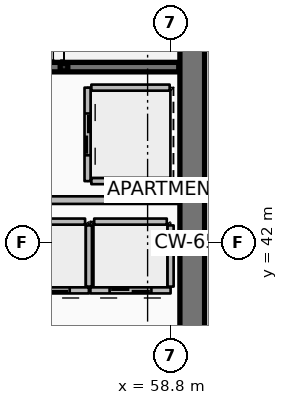
"""IFC4 building model, lengths in metres.
Left out: names, types, materials, properties, quantities, classifications, styles, units other than length and angle.
Written with IfcOpenShell. Run it as: python <this file> out.ifc"""

import sys

from ifc_helpers import new_model, si_unit, direction, frame, frame_2d, origin, origin_2d, place, context, subcontext, project, spatial, rectangle, hollow_rectangle, extrude, element, fill, save


model = new_model("IFC4")
c1 = context("Model", 3, precision=1e-05, world=origin(), true_north=direction((0.0, 1.0)))
c2 = subcontext(c1, "Body", "Model", "MODEL_VIEW")
j1 = project(units=[si_unit("LENGTHUNIT", "METRE"), si_unit("PLANEANGLEUNIT", "RADIAN")], contexts=[c1])
p1 = place(None, origin())
s1 = spatial("IfcSite", under=j1, at=p1, CompositionType="ELEMENT")
p2 = place(p1, origin())
s2 = spatial("IfcBuilding", under=s1, at=p2, CompositionType="ELEMENT")
p3 = place(p2, frame((0.0, 0.0, 259.8)))
s3 = spatial("IfcBuildingStorey", under=s2, at=p3, CompositionType="ELEMENT", Elevation=259.8)
p4 = place(p3, frame((59.375, 34.0, 0.0), z_axis=(0.0, 0.0, 1.0), x_axis=(0.0, 1.0, 0.0)))
e1 = element("IfcWall", 1, at=p4, inside=s3, PredefinedType="SHEAR", context=c2, shape_type="SweptSolid", body=[
    extrude(rectangle(XDim=16.0, YDim=0.65, at=frame_2d((8.0, 0.0))), origin(), (0.0, 0.0, 1.0), 3.85),
])
p5 = place(p3, frame((56.0, 46.62, 0.0), z_axis=(0.0, 0.0, 1.0), x_axis=(1.0, 0.0, 0.0)))
e2 = element("IfcColumn", 2, at=p5, inside=s3, PredefinedType="COLUMN", context=c2, shape_type="SweptSolid", body=[
    extrude(hollow_rectangle(XDim=0.2, YDim=0.2, WallThickness=0.01, InnerFilletRadius=0.01, OuterFilletRadius=0.02, at=origin_2d()), origin(), (0.0, 0.0, 1.0), 1.72),
])
p6 = place(p3, frame((51.48, 46.62, 0.0), z_axis=(0.0, 0.0, 1.0), x_axis=(1.0, 0.0, 0.0)))
e3 = element("IfcWall", 3, at=p6, inside=s3, PredefinedType="SOLIDWALL", context=c2, shape_type="SweptSolid", body=[
    extrude(rectangle(XDim=7.54, YDim=0.25, at=frame_2d((3.77, 0.0))), origin(), (0.0, 0.0, 1.0), 3.59),
])
p7 = place(p6, frame((0.3, 0.0, 0.0)))
e4 = element("IfcOpeningElement", 4, at=p7, cuts=e3, PredefinedType="OPENING", context=c2, shape_type="SweptSolid", body=[
    extrude(rectangle(XDim=1.55, YDim=2.15, at=frame_2d((0.775, 1.075))), frame((0.0, 0.135, 0.0), z_axis=(0.0, -1.0, 0.0), x_axis=(1.0, 0.0, 0.0)), (0.0, 0.0, 1.0), 0.27),
])
p8 = place(p3, frame((56.655, 40.745, 0.0), z_axis=(0.0, 0.0, 1.0), x_axis=(-1.0, 0.0, 0.0)))
e5 = element("IfcWall", 5, at=p8, inside=s3, PredefinedType="PARTITIONING", context=c2, shape_type="SweptSolid", body=[
    extrude(rectangle(XDim=2.11, YDim=0.16, at=frame_2d((1.055, 0.0))), origin(), (0.0, 0.0, 1.0), 3.59),
])
p9 = place(p8, frame((0.505, 0.0, 0.0)))
e6 = element("IfcOpeningElement", 6, at=p9, cuts=e5, PredefinedType="OPENING", context=c2, shape_type="SweptSolid", body=[
    extrude(rectangle(XDim=1.1, YDim=2.1, at=frame_2d((0.55, 1.05))), frame((0.0, 0.09, 0.0), z_axis=(0.0, -1.0, 0.0), x_axis=(1.0, 0.0, 0.0)), (0.0, 0.0, 1.0), 0.18),
])
p10 = place(p3, frame((56.655, 40.845, 0.0), z_axis=(0.0, 0.0, 1.0), x_axis=(0.0, 1.0, 0.0)))
e7 = element("IfcWall", 7, at=p10, inside=s3, PredefinedType="PARTITIONING", context=c2, shape_type="SweptSolid", body=[
    extrude(rectangle(XDim=1.61, YDim=0.16, at=frame_2d((0.805, 0.0))), origin(), (0.0, 0.0, 1.0), 3.59),
])
p11 = place(p3, frame((54.645, 42.555, 0.0), z_axis=(0.0, 0.0, 1.0), x_axis=(1.0, 0.0, 0.0)))
e8 = element("IfcWall", 8, at=p11, inside=s3, PredefinedType="PARTITIONING", context=c2, shape_type="SweptSolid", body=[
    extrude(rectangle(XDim=1.91, YDim=0.16, at=frame_2d((0.955, 0.0))), origin(), (0.0, 0.0, 1.0), 3.59),
])
p12 = place(p3, frame((58.805, 40.745, 0.0), z_axis=(0.0, 0.0, 1.0), x_axis=(-1.0, 0.0, 0.0)))
e9 = element("IfcWall", 9, at=p12, inside=s3, PredefinedType="PARTITIONING", context=c2, shape_type="SweptSolid", body=[
    extrude(rectangle(XDim=2.11, YDim=0.16, at=frame_2d((1.055, 0.0))), origin(), (0.0, 0.0, 1.0), 3.59),
])
p13 = place(p12, frame((0.505, 0.0, 0.0)))
e10 = element("IfcOpeningElement", 10, at=p13, cuts=e9, PredefinedType="OPENING", context=c2, shape_type="SweptSolid", body=[
    extrude(rectangle(XDim=1.1, YDim=2.1, at=frame_2d((0.55, 1.05))), frame((0.0, 0.09, 0.0), z_axis=(0.0, -1.0, 0.0), x_axis=(1.0, 0.0, 0.0)), (0.0, 0.0, 1.0), 0.18),
])
p14 = place(p3, frame((58.805, 40.845, 0.0), z_axis=(0.0, 0.0, 1.0), x_axis=(0.0, 1.0, 0.0)))
e11 = element("IfcWall", 11, at=p14, inside=s3, PredefinedType="PARTITIONING", context=c2, shape_type="SweptSolid", body=[
    extrude(rectangle(XDim=1.61, YDim=0.16, at=frame_2d((0.805, 0.0))), origin(), (0.0, 0.0, 1.0), 3.59),
])
p15 = place(p3, frame((56.795, 42.555, 0.0), z_axis=(0.0, 0.0, 1.0), x_axis=(1.0, 0.0, 0.0)))
e12 = element("IfcWall", 12, at=p15, inside=s3, PredefinedType="PARTITIONING", context=c2, shape_type="SweptSolid", body=[
    extrude(rectangle(XDim=1.91, YDim=0.16, at=frame_2d((0.955, 0.0))), origin(), (0.0, 0.0, 1.0), 3.59),
])
p16 = place(p3, frame((56.62, 46.08, 0.0), z_axis=(0.0, 0.0, 1.0), x_axis=(0.0, -1.0, 0.0)))
e13 = element("IfcWall", 13, at=p16, inside=s3, PredefinedType="PARTITIONING", context=c2, shape_type="SweptSolid", body=[
    extrude(rectangle(XDim=2.46, YDim=0.16, at=frame_2d((1.23, 0.0))), origin(), (0.0, 0.0, 1.0), 3.59),
])
p17 = place(p16, frame((0.68, 0.0, 0.0)))
e14 = element("IfcOpeningElement", 14, at=p17, cuts=e13, PredefinedType="OPENING", context=c2, shape_type="SweptSolid", body=[
    extrude(rectangle(XDim=1.1, YDim=2.1, at=frame_2d((0.55, 1.05))), frame((0.0, 0.09, 0.0), z_axis=(0.0, -1.0, 0.0), x_axis=(1.0, 0.0, 0.0)), (0.0, 0.0, 1.0), 0.18),
])
for number, where, z_axis, x_axis in (
    (15, (56.72, 46.08, 0.0), (0.0, 0.0, 1.0), (1.0, 0.0, 0.0)),
    (16, (56.72, 43.62, 0.0), (0.0, 0.0, 1.0), (1.0, 0.0, 0.0)),
):
    element("IfcWall", number, at=place(p3, frame(where, z_axis=z_axis, x_axis=x_axis)), inside=s3, PredefinedType="PARTITIONING", context=c2, shape_type="SweptSolid", body=[
        extrude(rectangle(XDim=2.06, YDim=0.16, at=frame_2d((1.03, 0.0))), origin(), (0.0, 0.0, 1.0), 3.59),
    ])
p18 = place(p3, frame((50.12, 43.12, 0.0), z_axis=(0.0, 0.0, 1.0), x_axis=(1.0, 0.0, 0.0)))
e17 = element("IfcWall", 17, at=p18, inside=s3, PredefinedType="PARTITIONING", context=c2, shape_type="SweptSolid", body=[
    extrude(rectangle(XDim=8.88, YDim=0.2, at=frame_2d((4.44, 0.0))), origin(), (0.0, 0.0, 1.0), 3.59),
])
p19 = place(p9, origin())
e18 = element("IfcDoor", 18, at=p19, inside=s3, OperationType="DOUBLE_DOOR_SLIDING", PredefinedType="DOOR", context=c2, shape_type="SweptSolid", body=[
    extrude(rectangle(XDim=1.1, YDim=2.1, at=frame_2d((0.55, 1.05))), frame((0.0, 0.025, 0.0), z_axis=(0.0, -1.0, 0.0), x_axis=(1.0, 0.0, 0.0)), (0.0, 0.0, 1.0), 0.05),
])
fill(e6, e18)
p20 = place(p13, origin())
e19 = element("IfcDoor", 19, at=p20, inside=s3, OperationType="DOUBLE_DOOR_SLIDING", PredefinedType="DOOR", context=c2, shape_type="SweptSolid", body=[
    extrude(rectangle(XDim=1.1, YDim=2.1, at=frame_2d((0.55, 1.05))), frame((0.0, 0.025, 0.0), z_axis=(0.0, -1.0, 0.0), x_axis=(1.0, 0.0, 0.0)), (0.0, 0.0, 1.0), 0.05),
])
fill(e10, e19)
p21 = place(p17, origin())
e20 = element("IfcDoor", 20, at=p21, inside=s3, OperationType="DOUBLE_DOOR_SLIDING", PredefinedType="DOOR", context=c2, shape_type="SweptSolid", body=[
    extrude(rectangle(XDim=1.1, YDim=2.1, at=frame_2d((0.55, 1.05))), frame((0.0, 0.025, 0.0), z_axis=(0.0, -1.0, 0.0), x_axis=(1.0, 0.0, 0.0)), (0.0, 0.0, 1.0), 0.05),
])
fill(e14, e20)
save(model, sys.argv[1])
